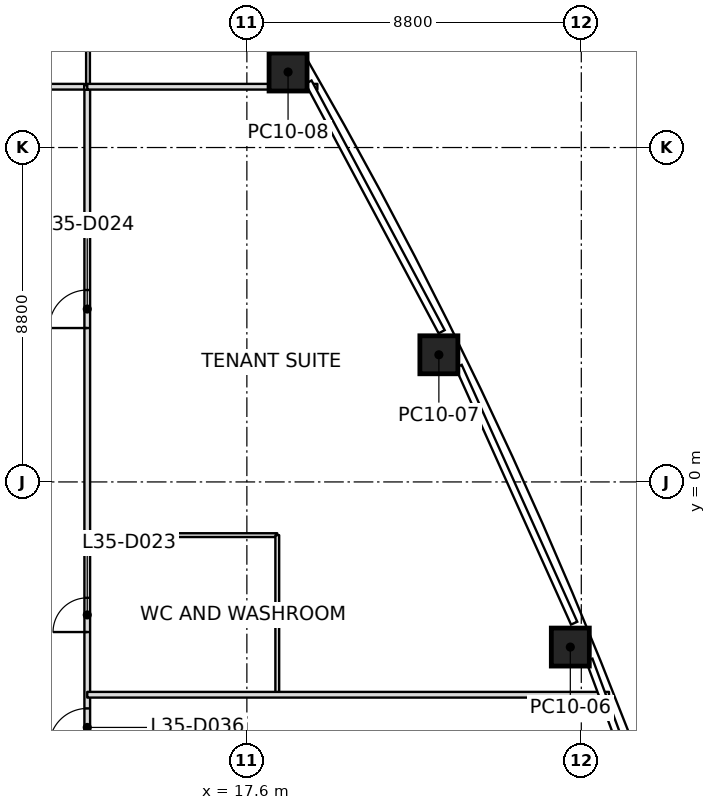
"""IFC4 building model, lengths in metres.
Left out: names, types, materials, properties, quantities, classifications, styles, units other than length and angle.
Written with IfcOpenShell. Run it as: python <this file> out.ifc"""

import sys

from ifc_helpers import new_model, si_unit, direction, frame, frame_2d, origin, origin_2d, place, context, subcontext, project, spatial, rectangle, extrude, element, fill, save


model = new_model("IFC4")
c1 = context("Model", 3, precision=1e-05, world=origin(), true_north=direction((0.0, 1.0)))
c2 = subcontext(c1, "Body", "Model", "MODEL_VIEW")
j1 = project(units=[si_unit("LENGTHUNIT", "METRE"), si_unit("PLANEANGLEUNIT", "RADIAN")], contexts=[c1])
p1 = place(None, origin())
s1 = spatial("IfcSite", under=j1, at=p1, CompositionType="ELEMENT")
p2 = place(p1, origin())
s2 = spatial("IfcBuilding", under=s1, at=p2, CompositionType="ELEMENT")
p3 = place(p2, frame((0.0, 0.0, 161.8)))
s3 = spatial("IfcBuildingStorey", under=s2, at=p3, CompositionType="ELEMENT", Elevation=161.8)
p4 = place(p3, frame((26.111, -4.345, 0.0), z_axis=(-0.017879535448, 0.010068680372, 0.999789449778), x_axis=(-0.379133932598, 0.925201775595, -0.016097688918)))
e1 = element("IfcColumn", 1, at=p4, inside=s3, PredefinedType="COLUMN", context=c2, shape_type="SweptSolid", body=[
    extrude(rectangle(XDim=1.0, YDim=1.0, at=origin_2d()), origin(), (0.0, 0.0, 1.0), 4.001),
])
p5 = place(p3, frame((22.652, 3.346, 0.0), z_axis=(-0.014097689605, 0.002074984617, 0.999898469639), x_axis=(-0.440551988154, 0.897690788492, -0.008074279545)))
e2 = element("IfcColumn", 2, at=p5, inside=s3, PredefinedType="COLUMN", context=c2, shape_type="SweptSolid", body=[
    extrude(rectangle(XDim=1.0, YDim=1.0, at=origin_2d()), origin(), (0.0, 0.0, 1.0), 4.0),
])
p6 = place(p3, frame((18.684, 10.787, 0.0), z_axis=(-0.009887052741, -0.005675900648, 0.999935013058), x_axis=(-0.49997556095, 0.866039512773, -2.7732311e-05)))
e3 = element("IfcColumn", 3, at=p6, inside=s3, PredefinedType="COLUMN", context=c2, shape_type="SweptSolid", body=[
    extrude(rectangle(XDim=1.0, YDim=1.0, at=origin_2d()), origin(), (0.0, 0.0, 1.0), 4.0),
])
p7 = place(p3, frame((27.129, -5.6, 0.0), z_axis=(0.0, 0.0, 1.0), x_axis=(-1.0, 0.0, 0.0)))
e4 = element("IfcWall", 4, at=p7, inside=s3, PredefinedType="PARTITIONING", context=c2, shape_type="SweptSolid", body=[
    extrude(rectangle(XDim=13.729, YDim=0.15, at=frame_2d((6.865, 0.0))), origin(), (0.0, 0.0, 1.0), 3.234),
])
p8 = place(p3, frame((13.4, 10.4, 0.0), z_axis=(0.0, 0.0, 1.0), x_axis=(1.0, 0.0, 0.0)))
e5 = element("IfcWall", 5, at=p8, inside=s3, PredefinedType="PARTITIONING", context=c2, shape_type="SweptSolid", body=[
    extrude(rectangle(XDim=6.055, YDim=0.15, at=frame_2d((3.028, 0.0))), origin(), (0.0, 0.0, 1.0), 3.234),
])
p9 = place(p3, frame((13.32, 10.4, 0.0), z_axis=(0.0, 0.0, 1.0), x_axis=(-1.0, 0.0, 0.0)))
e6 = element("IfcWall", 6, at=p9, inside=s3, PredefinedType="PARTITIONING", context=c2, shape_type="SweptSolid", body=[
    extrude(rectangle(XDim=26.64, YDim=0.15, at=frame_2d((13.32, 0.0))), origin(), (0.0, 0.0, 1.0), 3.166),
])
p10 = place(p9, frame((0.95, 0.0, 0.0)))
e7 = element("IfcOpeningElement", 7, at=p10, cuts=e6, PredefinedType="OPENING", context=c2, shape_type="SweptSolid", body=[
    extrude(rectangle(XDim=0.9, YDim=2.1, at=frame_2d((0.45, 1.05))), frame((0.0, 0.075, 0.0), z_axis=(0.0, -1.0, 0.0), x_axis=(1.0, 0.0, 0.0)), (0.0, 0.0, 1.0), 0.15),
])
p11 = place(p9, frame((6.36, 0.0, 0.0)))
e8 = element("IfcOpeningElement", 8, at=p11, cuts=e6, PredefinedType="OPENING", context=c2, shape_type="SweptSolid", body=[
    extrude(rectangle(XDim=1.0, YDim=2.1, at=frame_2d((0.5, 1.05))), frame((0.0, 0.075, 0.0), z_axis=(0.0, -1.0, 0.0), x_axis=(1.0, 0.0, 0.0)), (0.0, 0.0, 1.0), 0.15),
])
p12 = place(p9, frame((12.37, 0.0, 0.0)))
e9 = element("IfcOpeningElement", 9, at=p12, cuts=e6, PredefinedType="OPENING", context=c2, shape_type="SweptSolid", body=[
    extrude(rectangle(XDim=0.9, YDim=2.1, at=frame_2d((0.45, 1.05))), frame((0.0, 0.075, 0.0), z_axis=(0.0, -1.0, 0.0), x_axis=(1.0, 0.0, 0.0)), (0.0, 0.0, 1.0), 0.15),
])
p13 = place(p9, frame((20.38, 0.0, 0.0)))
e10 = element("IfcOpeningElement", 10, at=p13, cuts=e6, PredefinedType="OPENING", context=c2, shape_type="SweptSolid", body=[
    extrude(rectangle(XDim=1.0, YDim=2.1, at=frame_2d((0.5, 1.05))), frame((0.0, 0.075, 0.0), z_axis=(0.0, -1.0, 0.0), x_axis=(1.0, 0.0, 0.0)), (0.0, 0.0, 1.0), 0.15),
])
p14 = place(p3, frame((13.4, -10.32, 0.0), z_axis=(0.0, 0.0, 1.0), x_axis=(0.0, 1.0, 0.0)))
e11 = element("IfcWall", 11, at=p14, inside=s3, PredefinedType="PARTITIONING", context=c2, shape_type="SweptSolid", body=[
    extrude(rectangle(XDim=20.64, YDim=0.15, at=frame_2d((10.32, 0.0))), origin(), (0.0, 0.0, 1.0), 3.166),
])
p15 = place(p14, frame((6.37, 0.0, 0.0)))
e12 = element("IfcOpeningElement", 12, at=p15, cuts=e11, PredefinedType="OPENING", context=c2, shape_type="SweptSolid", body=[
    extrude(rectangle(XDim=0.9, YDim=2.1, at=frame_2d((0.45, 1.05))), frame((0.0, 0.075, 0.0), z_axis=(0.0, -1.0, 0.0), x_axis=(1.0, 0.0, 0.0)), (0.0, 0.0, 1.0), 0.15),
])
p16 = place(p14, frame((14.37, 0.0, 0.0)))
e13 = element("IfcOpeningElement", 13, at=p16, cuts=e11, PredefinedType="OPENING", context=c2, shape_type="SweptSolid", body=[
    extrude(rectangle(XDim=1.0, YDim=2.1, at=frame_2d((0.5, 1.05))), frame((0.0, 0.075, 0.0), z_axis=(0.0, -1.0, 0.0), x_axis=(1.0, 0.0, 0.0)), (0.0, 0.0, 1.0), 0.15),
])
p17 = place(p14, frame((0.95, 0.0, 0.0)))
e14 = element("IfcOpeningElement", 14, at=p17, cuts=e11, PredefinedType="OPENING", context=c2, shape_type="SweptSolid", body=[
    extrude(rectangle(XDim=0.9, YDim=2.1, at=frame_2d((0.45, 1.05))), frame((0.0, 0.075, 0.0), z_axis=(0.0, -1.0, 0.0), x_axis=(1.0, 0.0, 0.0)), (0.0, 0.0, 1.0), 0.15),
])
p18 = place(p14, frame((3.36, 0.0, 0.0)))
e15 = element("IfcOpeningElement", 15, at=p18, cuts=e11, PredefinedType="OPENING", context=c2, shape_type="SweptSolid", body=[
    extrude(rectangle(XDim=1.0, YDim=2.1, at=frame_2d((0.5, 1.05))), frame((0.0, 0.075, 0.0), z_axis=(0.0, -1.0, 0.0), x_axis=(1.0, 0.0, 0.0)), (0.0, 0.0, 1.0), 0.15),
])
p19 = place(p3, frame((13.42, 14.0, 0.0), z_axis=(0.0, 0.0, 1.0), x_axis=(0.0, -1.0, 0.0)))
e16 = element("IfcWall", 16, at=p19, inside=s3, PredefinedType="PARTITIONING", context=c2, shape_type="SweptSolid", body=[
    extrude(rectangle(XDim=3.57, YDim=0.1, at=frame_2d((1.785, 0.0))), origin(), (0.0, 0.0, 1.0), 3.393),
])
p20 = place(p3, frame((13.43, -1.4, 0.0), z_axis=(0.0, 0.0, 1.0), x_axis=(1.0, 0.0, 0.0)))
e17 = element("IfcWall", 17, at=p20, inside=s3, PredefinedType="PARTITIONING", context=c2, shape_type="SweptSolid", body=[
    extrude(rectangle(XDim=4.97, YDim=0.1, at=frame_2d((2.485, 0.0))), origin(), (0.0, 0.0, 1.0), 3.317),
])
p21 = place(p3, frame((18.4, -1.4, 0.0), z_axis=(0.0, 0.0, 1.0), x_axis=(0.0, -1.0, 0.0)))
e18 = element("IfcWall", 18, at=p21, inside=s3, PredefinedType="PARTITIONING", context=c2, shape_type="SweptSolid", body=[
    extrude(rectangle(XDim=4.17, YDim=0.1, at=frame_2d((2.085, 0.0))), origin(), (0.0, 0.0, 1.0), 3.247),
])
p22 = place(p15, origin())
e19 = element("IfcDoor", 19, at=p22, inside=s3, OperationType="SINGLE_SWING_LEFT", PredefinedType="DOOR", context=c2, shape_type="SweptSolid", body=[
    extrude(rectangle(XDim=0.9, YDim=2.1, at=frame_2d((0.45, 1.05))), frame((0.0, 0.025, 0.0), z_axis=(0.0, -1.0, 0.0), x_axis=(1.0, 0.0, 0.0)), (0.0, 0.0, 1.0), 0.05),
])
fill(e12, e19)
p23 = place(p16, origin())
e20 = element("IfcDoor", 20, at=p23, inside=s3, OperationType="SINGLE_SWING_LEFT", PredefinedType="DOOR", context=c2, shape_type="SweptSolid", body=[
    extrude(rectangle(XDim=1.0, YDim=2.1, at=frame_2d((0.5, 1.05))), frame((0.0, 0.025, 0.0), z_axis=(0.0, -1.0, 0.0), x_axis=(1.0, 0.0, 0.0)), (0.0, 0.0, 1.0), 0.05),
])
fill(e13, e20)
p24 = place(p18, origin())
e21 = element("IfcDoor", 21, at=p24, inside=s3, OperationType="SINGLE_SWING_RIGHT", PredefinedType="DOOR", context=c2, shape_type="SweptSolid", body=[
    extrude(rectangle(XDim=1.0, YDim=2.1, at=frame_2d((0.5, 1.05))), frame((0.0, 0.025, 0.0), z_axis=(0.0, -1.0, 0.0), x_axis=(1.0, 0.0, 0.0)), (0.0, 0.0, 1.0), 0.05),
])
fill(e15, e21)
save(model, sys.argv[1])
